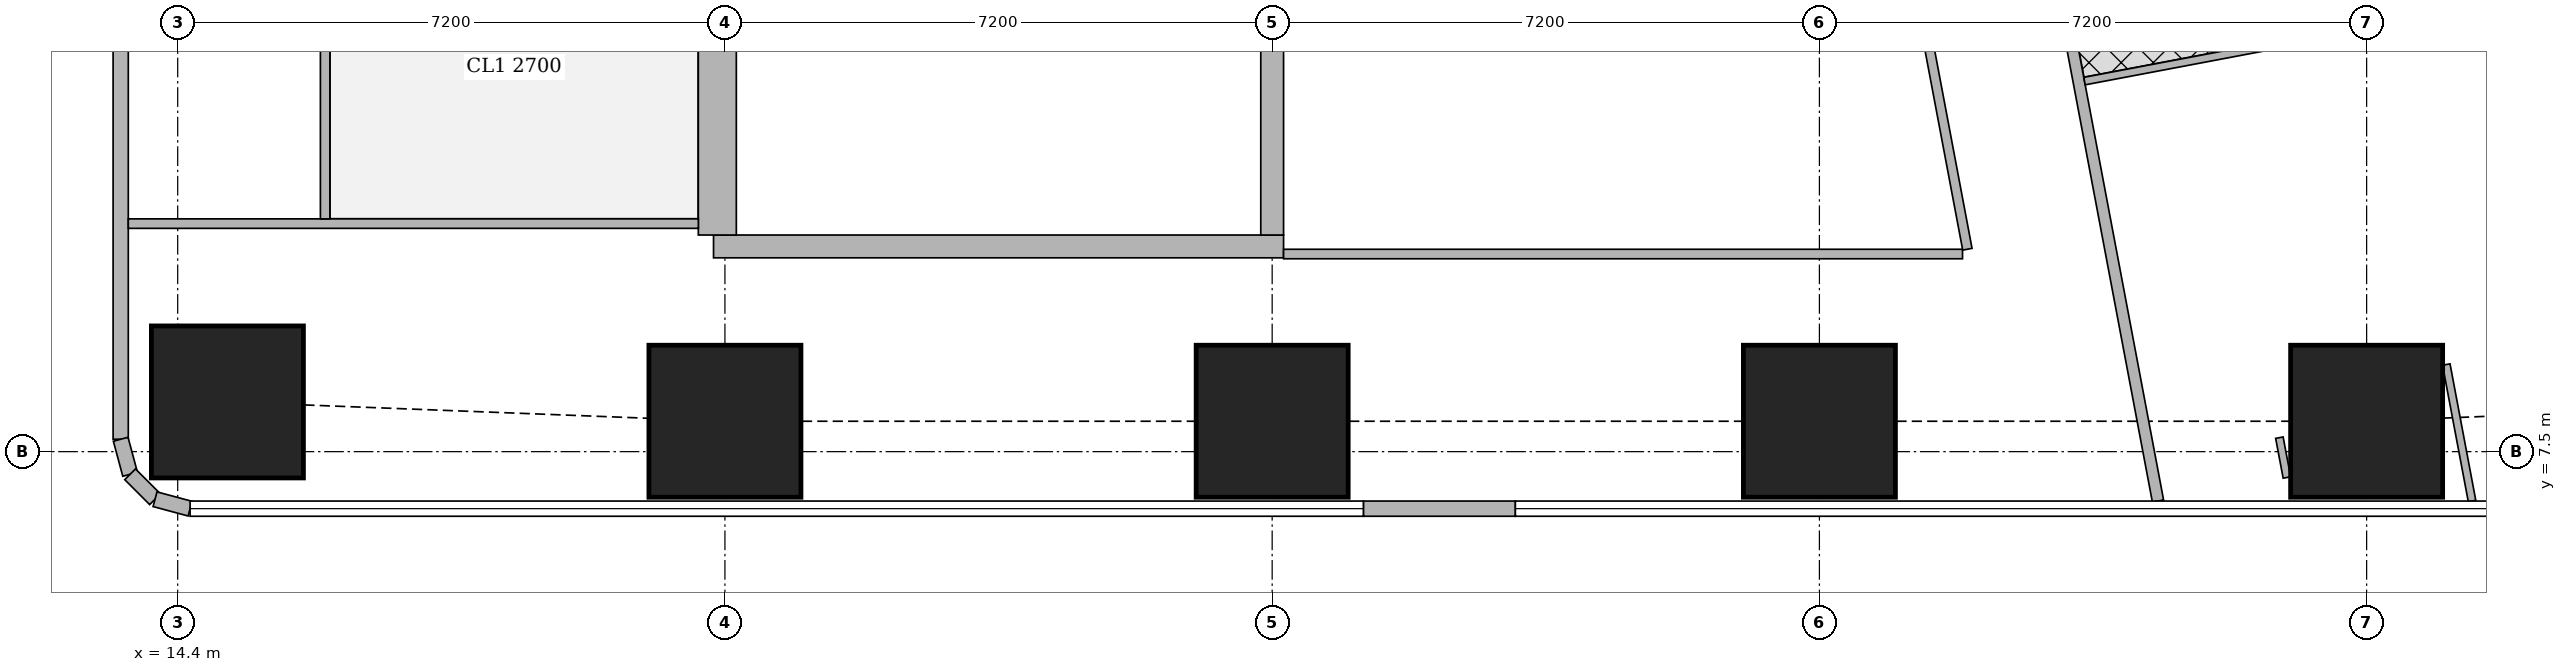
"""IFC4 building model, lengths in metres.
Left out: names, types, materials, properties, quantities, classifications, styles, units other than length and angle.
Written with IfcOpenShell. Run it as: python <this file> out.ifc"""

import sys

from ifc_helpers import new_model, si_unit, direction, frame, frame_2d, origin, origin_2d, place, context, subcontext, project, spatial, rectangle, extrude, element, fill, save


model = new_model("IFC4")
c1 = context("Model", 3, precision=1e-05, world=origin(), true_north=direction((0.0, 1.0)))
c2 = subcontext(c1, "Body", "Model", "MODEL_VIEW")
j1 = project(units=[si_unit("LENGTHUNIT", "METRE"), si_unit("PLANEANGLEUNIT", "RADIAN")], contexts=[c1])
p1 = place(None, origin())
s1 = spatial("IfcSite", under=j1, at=p1, CompositionType="ELEMENT")
p2 = place(p1, origin())
s2 = spatial("IfcBuilding", under=s1, at=p2, CompositionType="ELEMENT")
p3 = place(p2, frame((0.0, 0.0, 251.6)))
s3 = spatial("IfcBuildingStorey", under=s2, at=p3, CompositionType="ELEMENT", Elevation=251.6)
for number, where, z_axis, x_axis in (
    (1, (15.054, 8.154, 0.0), (0.0, 0.0, 1.0), (1.0, 0.0, 0.0)),
    (2, (21.6, 7.9, 0.0), (0.0, 0.0, 1.0), (1.0, 0.0, 0.0)),
    (3, (28.8, 7.9, 0.0), (0.0, 0.0, 1.0), (1.0, 0.0, 0.0)),
    (4, (36.0, 7.9, 0.0), (0.0, 0.0, 1.0), (1.0, 0.0, 0.0)),
    (5, (43.2, 7.9, 0.0), (0.0, 0.0, 1.0), (1.0, 0.0, 0.0)),
):
    element("IfcColumn", number, at=place(p3, frame(where, z_axis=z_axis, x_axis=x_axis)), inside=s3, PredefinedType="COLUMN", context=c2, shape_type="SweptSolid", body=[
        extrude(rectangle(XDim=2.0, YDim=2.0, at=origin_2d()), origin(), (0.0, 0.0, 1.0), 3.75),
    ])
p4 = place(p3, frame((21.45, 10.2, 0.0), z_axis=(0.0, 0.0, 1.0), x_axis=(1.0, 0.0, 0.0)))
e6 = element("IfcWall", 6, at=p4, inside=s3, PredefinedType="SHEAR", context=c2, shape_type="SweptSolid", body=[
    extrude(rectangle(XDim=7.5, YDim=0.3, at=frame_2d((3.75, 0.0))), origin(), (0.0, 0.0, 1.0), 3.75),
])
p5 = place(p4, frame((1.2, 0.0, 0.0)))
e7 = element("IfcOpeningElement", 7, at=p5, cuts=e6, PredefinedType="OPENING", context=c2, shape_type="SweptSolid", body=[
    extrude(rectangle(XDim=1.1, YDim=2.1, at=frame_2d((0.55, 1.05))), frame((0.0, 0.16, 0.0), z_axis=(0.0, -1.0, 0.0), x_axis=(1.0, 0.0, 0.0)), (0.0, 0.0, 1.0), 0.32),
])
p6 = place(p3, frame((21.5, 10.35, 0.0), z_axis=(0.0, 0.0, 1.0), x_axis=(0.0, 1.0, 0.0)))
e8 = element("IfcWall", 8, at=p6, inside=s3, PredefinedType="SHEAR", context=c2, shape_type="SweptSolid", body=[
    extrude(rectangle(XDim=4.2, YDim=0.5, at=frame_2d((2.1, 0.0))), origin(), (0.0, 0.0, 1.0), 3.75),
])
p7 = place(p3, frame((28.8, 10.35, 0.0), z_axis=(0.0, 0.0, 1.0), x_axis=(0.0, 1.0, 0.0)))
e9 = element("IfcWall", 9, at=p7, inside=s3, PredefinedType="SHEAR", context=c2, shape_type="SweptSolid", body=[
    extrude(rectangle(XDim=4.2, YDim=0.3, at=frame_2d((2.1, 0.0))), origin(), (0.0, 0.0, 1.0), 3.75),
])
p8 = place(p3, frame((30.0, 6.75, 0.0), z_axis=(0.0, 0.0, 1.0), x_axis=(1.0, 0.0, 0.0)))
e10 = element("IfcWall", 10, at=p8, inside=s3, PredefinedType="SOLIDWALL", context=c2, shape_type="SweptSolid", body=[
    extrude(rectangle(XDim=2.0, YDim=0.2, at=frame_2d((1.0, 0.0))), origin(), (0.0, 0.0, 1.0), 3.5),
])
p9 = place(p8, frame((0.5, 0.0, 0.0)))
e11 = element("IfcOpeningElement", 11, at=p9, cuts=e10, PredefinedType="OPENING", context=c2, shape_type="SweptSolid", body=[
    extrude(rectangle(XDim=1.0, YDim=2.4, at=frame_2d((0.5, 1.2))), frame((0.0, 0.11, 0.0), z_axis=(0.0, -1.0, 0.0), x_axis=(1.0, 0.0, 0.0)), (0.0, 0.0, 1.0), 0.22),
])
p10 = place(p3, frame((49.684, 7.832, 0.0), z_axis=(0.0, 0.0, 1.0), x_axis=(-0.185616669694, 0.982622232565, 0.0)))
e12 = element("IfcWall", 12, at=p10, inside=s3, PredefinedType="SOLIDWALL", context=c2, shape_type="SweptSolid", body=[
    extrude(rectangle(XDim=36.0, YDim=0.2, at=frame_2d((18.0, 0.0))), origin(), (0.0, 0.0, 1.0), 3.5),
])
p11 = place(p10, frame((2.518, 0.0, 0.9)))
e13 = element("IfcOpeningElement", 13, at=p11, cuts=e12, PredefinedType="OPENING", context=c2, shape_type="SweptSolid", body=[
    extrude(rectangle(XDim=2.4, YDim=1.5, at=frame_2d((1.2, 0.75))), frame((0.0, 0.11, 0.0), z_axis=(0.0, -1.0, 0.0), x_axis=(1.0, 0.0, 0.0)), (0.0, 0.0, 1.0), 0.22),
])
p12 = place(p10, frame((8.444, 0.0, 0.9)))
e14 = element("IfcOpeningElement", 14, at=p12, cuts=e12, PredefinedType="OPENING", context=c2, shape_type="SweptSolid", body=[
    extrude(rectangle(XDim=1.8, YDim=1.5, at=frame_2d((0.9, 0.75))), frame((0.0, 0.11, 0.0), z_axis=(0.0, -1.0, 0.0), x_axis=(1.0, 0.0, 0.0)), (0.0, 0.0, 1.0), 0.22),
])
p13 = place(p10, frame((12.261, 0.0, 0.9)))
e15 = element("IfcOpeningElement", 15, at=p13, cuts=e12, PredefinedType="OPENING", context=c2, shape_type="SweptSolid", body=[
    extrude(rectangle(XDim=1.8, YDim=1.5, at=frame_2d((0.9, 0.75))), frame((0.0, 0.11, 0.0), z_axis=(0.0, -1.0, 0.0), x_axis=(1.0, 0.0, 0.0)), (0.0, 0.0, 1.0), 0.22),
])
p14 = place(p10, frame((16.078, 0.0, 0.9)))
e16 = element("IfcOpeningElement", 16, at=p14, cuts=e12, PredefinedType="OPENING", context=c2, shape_type="SweptSolid", body=[
    extrude(rectangle(XDim=1.8, YDim=1.5, at=frame_2d((0.9, 0.75))), frame((0.0, 0.11, 0.0), z_axis=(0.0, -1.0, 0.0), x_axis=(1.0, 0.0, 0.0)), (0.0, 0.0, 1.0), 0.22),
])
p15 = place(p10, frame((19.894, 0.0, 0.9)))
e17 = element("IfcOpeningElement", 17, at=p15, cuts=e12, PredefinedType="OPENING", context=c2, shape_type="SweptSolid", body=[
    extrude(rectangle(XDim=1.8, YDim=1.5, at=frame_2d((0.9, 0.75))), frame((0.0, 0.11, 0.0), z_axis=(0.0, -1.0, 0.0), x_axis=(1.0, 0.0, 0.0)), (0.0, 0.0, 1.0), 0.22),
])
p16 = place(p10, frame((23.71, 0.0, 0.9)))
e18 = element("IfcOpeningElement", 18, at=p16, cuts=e12, PredefinedType="OPENING", context=c2, shape_type="SweptSolid", body=[
    extrude(rectangle(XDim=1.8, YDim=1.5, at=frame_2d((0.9, 0.75))), frame((0.0, 0.11, 0.0), z_axis=(0.0, -1.0, 0.0), x_axis=(1.0, 0.0, 0.0)), (0.0, 0.0, 1.0), 0.22),
])
p17 = place(p10, frame((27.526, 0.0, 0.9)))
e19 = element("IfcOpeningElement", 19, at=p17, cuts=e12, PredefinedType="OPENING", context=c2, shape_type="SweptSolid", body=[
    extrude(rectangle(XDim=1.8, YDim=1.5, at=frame_2d((0.9, 0.75))), frame((0.0, 0.11, 0.0), z_axis=(0.0, -1.0, 0.0), x_axis=(1.0, 0.0, 0.0)), (0.0, 0.0, 1.0), 0.22),
])
p18 = place(p10, frame((32.046, 0.0, 0.9)))
e20 = element("IfcOpeningElement", 20, at=p18, cuts=e12, PredefinedType="OPENING", context=c2, shape_type="SweptSolid", body=[
    extrude(rectangle(XDim=1.8, YDim=1.5, at=frame_2d((0.9, 0.75))), frame((0.0, 0.11, 0.0), z_axis=(0.0, -1.0, 0.0), x_axis=(1.0, 0.0, 0.0)), (0.0, 0.0, 1.0), 0.22),
])
p19 = place(p3, frame((13.65, 43.037, 0.0), z_axis=(0.0, 0.0, 1.0), x_axis=(0.0, -1.0, 0.0)))
e21 = element("IfcWall", 21, at=p19, inside=s3, PredefinedType="SOLIDWALL", context=c2, shape_type="SweptSolid", body=[
    extrude(rectangle(XDim=35.374, YDim=0.2, at=frame_2d((17.687, 0.0))), origin(), (0.0, 0.0, 1.0), 3.5),
])
p20 = place(p19, frame((1.959, 0.0, 0.9)))
e22 = element("IfcOpeningElement", 22, at=p20, cuts=e21, PredefinedType="OPENING", context=c2, shape_type="SweptSolid", body=[
    extrude(rectangle(XDim=1.8, YDim=1.5, at=frame_2d((0.9, 0.75))), frame((0.0, 0.11, 0.0), z_axis=(0.0, -1.0, 0.0), x_axis=(1.0, 0.0, 0.0)), (0.0, 0.0, 1.0), 0.22),
])
p21 = place(p3, frame((13.65, 7.663, 0.0), z_axis=(0.0, 0.0, 1.0), x_axis=(0.259698463175, -0.965689757751, 0.0)))
e23 = element("IfcWall", 23, at=p21, inside=s3, PredefinedType="SOLIDWALL", context=c2, shape_type="SweptSolid", body=[
    extrude(rectangle(XDim=0.478, YDim=0.2, at=frame_2d((0.239, 0.0))), origin(), (0.0, 0.0, 1.0), 3.5),
])
p22 = place(p3, frame((13.774, 7.202, 0.0), z_axis=(0.0, 0.0, 1.0), x_axis=(0.707369890659, -0.706843573776, 0.0)))
e24 = element("IfcWall", 24, at=p22, inside=s3, PredefinedType="SOLIDWALL", context=c2, shape_type="SweptSolid", body=[
    extrude(rectangle(XDim=0.464, YDim=0.2, at=frame_2d((0.232, 0.0))), origin(), (0.0, 0.0, 1.0), 3.5),
])
p23 = place(p3, frame((14.102, 6.874, 0.0), z_axis=(0.0, 0.0, 1.0), x_axis=(0.965655254015, -0.259826731483, 0.0)))
e25 = element("IfcWall", 25, at=p23, inside=s3, PredefinedType="SOLIDWALL", context=c2, shape_type="SweptSolid", body=[
    extrude(rectangle(XDim=0.477, YDim=0.2, at=frame_2d((0.239, 0.0))), origin(), (0.0, 0.0, 1.0), 3.5),
])
p24 = place(p3, frame((33.781, 42.186, 0.0), z_axis=(0.0, 0.0, 1.0), x_axis=(0.185593518645, -0.9826266055, 0.0)))
e26 = element("IfcWall", 26, at=p24, inside=s3, PredefinedType="SOLIDWALL", context=c2, shape_type="SweptSolid", body=[
    extrude(rectangle(XDim=35.961, YDim=0.15, at=frame_2d((17.98, 0.0))), origin(), (0.0, 0.0, 1.0), 2.5),
])
p25 = place(p24, frame((7.183, 0.0, 0.0)))
e27 = element("IfcOpeningElement", 27, at=p25, cuts=e26, PredefinedType="OPENING", context=c2, shape_type="SweptSolid", body=[
    extrude(rectangle(XDim=1.0, YDim=2.1, at=frame_2d((0.5, 1.05))), frame((0.0, 0.085, 0.0), z_axis=(0.0, -1.0, 0.0), x_axis=(1.0, 0.0, 0.0)), (0.0, 0.0, 1.0), 0.17),
])
p26 = place(p24, frame((11.76, 0.0, 0.0)))
e28 = element("IfcOpeningElement", 28, at=p26, cuts=e26, PredefinedType="OPENING", context=c2, shape_type="SweptSolid", body=[
    extrude(rectangle(XDim=1.0, YDim=2.1, at=frame_2d((0.5, 1.05))), frame((0.0, 0.085, 0.0), z_axis=(0.0, -1.0, 0.0), x_axis=(1.0, 0.0, 0.0)), (0.0, 0.0, 1.0), 0.17),
])
p27 = place(p24, frame((23.863, 0.0, 0.0)))
e29 = element("IfcOpeningElement", 29, at=p27, cuts=e26, PredefinedType="OPENING", context=c2, shape_type="SweptSolid", body=[
    extrude(rectangle(XDim=1.0, YDim=2.1, at=frame_2d((0.5, 1.05))), frame((0.0, 0.085, 0.0), z_axis=(0.0, -1.0, 0.0), x_axis=(1.0, 0.0, 0.0)), (0.0, 0.0, 1.0), 0.17),
])
p28 = place(p24, frame((30.502, 0.0, 0.0)))
e30 = element("IfcOpeningElement", 30, at=p28, cuts=e26, PredefinedType="OPENING", context=c2, shape_type="SweptSolid", body=[
    extrude(rectangle(XDim=1.0, YDim=2.1, at=frame_2d((0.5, 1.05))), frame((0.0, 0.085, 0.0), z_axis=(0.0, -1.0, 0.0), x_axis=(1.0, 0.0, 0.0)), (0.0, 0.0, 1.0), 0.17),
])
p29 = place(p3, frame((44.248, 8.646, 0.0), z_axis=(0.0, 0.0, 1.0), x_axis=(0.185417594585, -0.982659816833, 0.0)))
e31 = element("IfcWall", 31, at=p29, inside=s3, PredefinedType="PARTITIONING", context=c2, shape_type="SweptSolid", body=[
    extrude(rectangle(XDim=1.828, YDim=0.1, at=frame_2d((0.914, 0.0))), origin(), (0.0, 0.0, 1.0), 2.05),
])
p30 = place(p3, frame((42.151, 7.16, 0.0), z_axis=(0.0, 0.0, 1.0), x_axis=(-0.185366164644, 0.982669519729, 0.0)))
e32 = element("IfcWall", 32, at=p30, inside=s3, PredefinedType="PARTITIONING", context=c2, shape_type="SweptSolid", body=[
    extrude(rectangle(XDim=0.533, YDim=0.1, at=frame_2d((0.267, 0.0))), origin(), (0.0, 0.0, 1.0), 2.5),
])
p31 = place(p3, frame((42.952, 13.03, 0.0), z_axis=(0.0, 0.0, 1.0), x_axis=(-0.982585626838, -0.185810349366, 0.0)))
e33 = element("IfcWall", 33, at=p31, inside=s3, PredefinedType="PARTITIONING", context=c2, shape_type="SweptSolid", body=[
    extrude(rectangle(XDim=3.525, YDim=0.1, at=frame_2d((1.763, 0.0))), origin(), (0.0, 0.0, 1.0), 3.5),
])
p32 = place(p31, frame((1.299, 0.0, 0.0)))
e34 = element("IfcOpeningElement", 34, at=p32, cuts=e33, PredefinedType="OPENING", context=c2, shape_type="SweptSolid", body=[
    extrude(rectangle(XDim=0.9, YDim=2.1, at=frame_2d((0.45, 1.05))), frame((0.0, 0.06, 0.0), z_axis=(0.0, -1.0, 0.0), x_axis=(1.0, 0.0, 0.0)), (0.0, 0.0, 1.0), 0.12),
])
p33 = place(p3, frame((13.75, 10.5, 0.0), z_axis=(0.0, 0.0, 1.0), x_axis=(1.0, 0.0, 0.0)))
e35 = element("IfcWall", 35, at=p33, inside=s3, PredefinedType="PARTITIONING", context=c2, shape_type="SweptSolid", body=[
    extrude(rectangle(XDim=7.5, YDim=0.125, at=frame_2d((3.75, 0.0))), origin(), (0.0, 0.0, 1.0), 3.5),
])
p34 = place(p33, frame((4.245, 0.0, 0.0)))
e36 = element("IfcOpeningElement", 36, at=p34, cuts=e35, PredefinedType="OPENING", context=c2, shape_type="SweptSolid", body=[
    extrude(rectangle(XDim=1.8, YDim=2.1, at=frame_2d((0.9, 1.05))), frame((0.0, 0.073, 0.0), z_axis=(0.0, -1.0, 0.0), x_axis=(1.0, 0.0, 0.0)), (0.0, 0.0, 1.0), 0.145),
])
p35 = place(p3, frame((16.34, 10.562, 0.0), z_axis=(0.0, 0.0, 1.0), x_axis=(0.0, 1.0, 0.0)))
e37 = element("IfcWall", 37, at=p35, inside=s3, PredefinedType="PARTITIONING", context=c2, shape_type="SweptSolid", body=[
    extrude(rectangle(XDim=3.988, YDim=0.125, at=frame_2d((1.994, 0.0))), origin(), (0.0, 0.0, 1.0), 3.5),
])
p36 = place(p35, frame((1.438, 0.0, 0.0)))
e38 = element("IfcOpeningElement", 38, at=p36, cuts=e37, PredefinedType="OPENING", context=c2, shape_type="SweptSolid", body=[
    extrude(rectangle(XDim=1.0, YDim=2.1, at=frame_2d((0.5, 1.05))), frame((0.0, 0.073, 0.0), z_axis=(0.0, -1.0, 0.0), x_axis=(1.0, 0.0, 0.0)), (0.0, 0.0, 1.0), 0.145),
])
p37 = place(p3, frame((28.95, 10.1, 0.0), z_axis=(0.0, 0.0, 1.0), x_axis=(1.0, 0.0, 0.0)))
e39 = element("IfcWall", 39, at=p37, inside=s3, PredefinedType="PARTITIONING", context=c2, shape_type="SweptSolid", body=[
    extrude(rectangle(XDim=8.933, YDim=0.125, at=frame_2d((4.467, 0.0))), origin(), (0.0, 0.0, 1.0), 3.5),
])
p38 = place(p3, frame((37.947, 10.163, 0.0), z_axis=(0.0, 0.0, 1.0), x_axis=(-0.185589250699, 0.982627411599, 0.0)))
e40 = element("IfcWall", 40, at=p38, inside=s3, PredefinedType="PARTITIONING", context=c2, shape_type="SweptSolid", body=[
    extrude(rectangle(XDim=12.555, YDim=0.125, at=frame_2d((6.277, 0.0))), origin(), (0.0, 0.0, 1.0), 2.5),
])
p39 = place(p38, frame((0.708, 0.0, 0.0)))
e41 = element("IfcOpeningElement", 41, at=p39, cuts=e40, PredefinedType="OPENING", context=c2, shape_type="SweptSolid", body=[
    extrude(rectangle(XDim=1.0, YDim=2.1, at=frame_2d((0.5, 1.05))), frame((0.0, 0.073, 0.0), z_axis=(0.0, -1.0, 0.0), x_axis=(1.0, 0.0, 0.0)), (0.0, 0.0, 1.0), 0.145),
])
p40 = place(p38, frame((5.9, 0.0, 0.0)))
e42 = element("IfcOpeningElement", 42, at=p40, cuts=e40, PredefinedType="OPENING", context=c2, shape_type="SweptSolid", body=[
    extrude(rectangle(XDim=1.0, YDim=2.1, at=frame_2d((0.5, 1.05))), frame((0.0, 0.073, 0.0), z_axis=(0.0, -1.0, 0.0), x_axis=(1.0, 0.0, 0.0)), (0.0, 0.0, 1.0), 0.145),
])
p41 = place(p38, frame((9.562, 0.0, 0.0)))
e43 = element("IfcOpeningElement", 43, at=p41, cuts=e40, PredefinedType="OPENING", context=c2, shape_type="SweptSolid", body=[
    extrude(rectangle(XDim=1.0, YDim=2.1, at=frame_2d((0.5, 1.05))), frame((0.0, 0.073, 0.0), z_axis=(0.0, -1.0, 0.0), x_axis=(1.0, 0.0, 0.0)), (0.0, 0.0, 1.0), 0.145),
])
p42 = place(p9, origin())
e44 = element("IfcDoor", 44, at=p42, inside=s3, OperationType="SINGLE_SWING_RIGHT", PredefinedType="DOOR", context=c2, shape_type="SweptSolid", body=[
    extrude(rectangle(XDim=1.0, YDim=2.4, at=frame_2d((0.5, 1.2))), frame((0.0, 0.025, 0.0), z_axis=(0.0, -1.0, 0.0), x_axis=(1.0, 0.0, 0.0)), (0.0, 0.0, 1.0), 0.05),
])
fill(e11, e44)
p43 = place(p32, origin())
e45 = element("IfcDoor", 45, at=p43, inside=s3, OperationType="SINGLE_SWING_RIGHT", PredefinedType="DOOR", context=c2, shape_type="SweptSolid", body=[
    extrude(rectangle(XDim=0.9, YDim=2.1, at=frame_2d((0.45, 1.05))), frame((0.0, 0.025, 0.0), z_axis=(0.0, -1.0, 0.0), x_axis=(1.0, 0.0, 0.0)), (0.0, 0.0, 1.0), 0.05),
])
fill(e34, e45)
p44 = place(p28, origin())
e46 = element("IfcDoor", 46, at=p44, inside=s3, OperationType="SINGLE_SWING_LEFT", PredefinedType="DOOR", context=c2, shape_type="SweptSolid", body=[
    extrude(rectangle(XDim=1.0, YDim=2.1, at=frame_2d((0.5, 1.05))), frame((0.0, 0.025, 0.0), z_axis=(0.0, -1.0, 0.0), x_axis=(1.0, 0.0, 0.0)), (0.0, 0.0, 1.0), 0.05),
])
fill(e30, e46)
p45 = place(p36, origin())
e47 = element("IfcDoor", 47, at=p45, inside=s3, OperationType="SINGLE_SWING_LEFT", PredefinedType="DOOR", context=c2, shape_type="SweptSolid", body=[
    extrude(rectangle(XDim=1.0, YDim=2.1, at=frame_2d((0.5, 1.05))), frame((0.0, 0.025, 0.0), z_axis=(0.0, -1.0, 0.0), x_axis=(1.0, 0.0, 0.0)), (0.0, 0.0, 1.0), 0.05),
])
fill(e38, e47)
p46 = place(p34, origin())
e48 = element("IfcDoor", 48, at=p46, inside=s3, OperationType="DOUBLE_DOOR_SINGLE_SWING", PredefinedType="DOOR", context=c2, shape_type="SweptSolid", body=[
    extrude(rectangle(XDim=1.8, YDim=2.1, at=frame_2d((0.9, 1.05))), frame((0.0, 0.025, 0.0), z_axis=(0.0, -1.0, 0.0), x_axis=(1.0, 0.0, 0.0)), (0.0, 0.0, 1.0), 0.05),
])
fill(e36, e48)
p47 = place(p39, origin())
e49 = element("IfcDoor", 49, at=p47, inside=s3, OperationType="SINGLE_SWING_LEFT", PredefinedType="DOOR", context=c2, shape_type="SweptSolid", body=[
    extrude(rectangle(XDim=1.0, YDim=2.1, at=frame_2d((0.5, 1.05))), frame((0.0, 0.025, 0.0), z_axis=(0.0, -1.0, 0.0), x_axis=(1.0, 0.0, 0.0)), (0.0, 0.0, 1.0), 0.05),
])
fill(e41, e49)
p48 = place(p5, origin())
e50 = element("IfcDoor", 50, at=p48, inside=s3, OperationType="SINGLE_SWING_LEFT", PredefinedType="DOOR", context=c2, shape_type="SweptSolid", body=[
    extrude(rectangle(XDim=1.1, YDim=2.1, at=frame_2d((0.55, 1.05))), frame((0.0, 0.025, 0.0), z_axis=(0.0, -1.0, 0.0), x_axis=(1.0, 0.0, 0.0)), (0.0, 0.0, 1.0), 0.05),
])
fill(e7, e50)
save(model, sys.argv[1])
